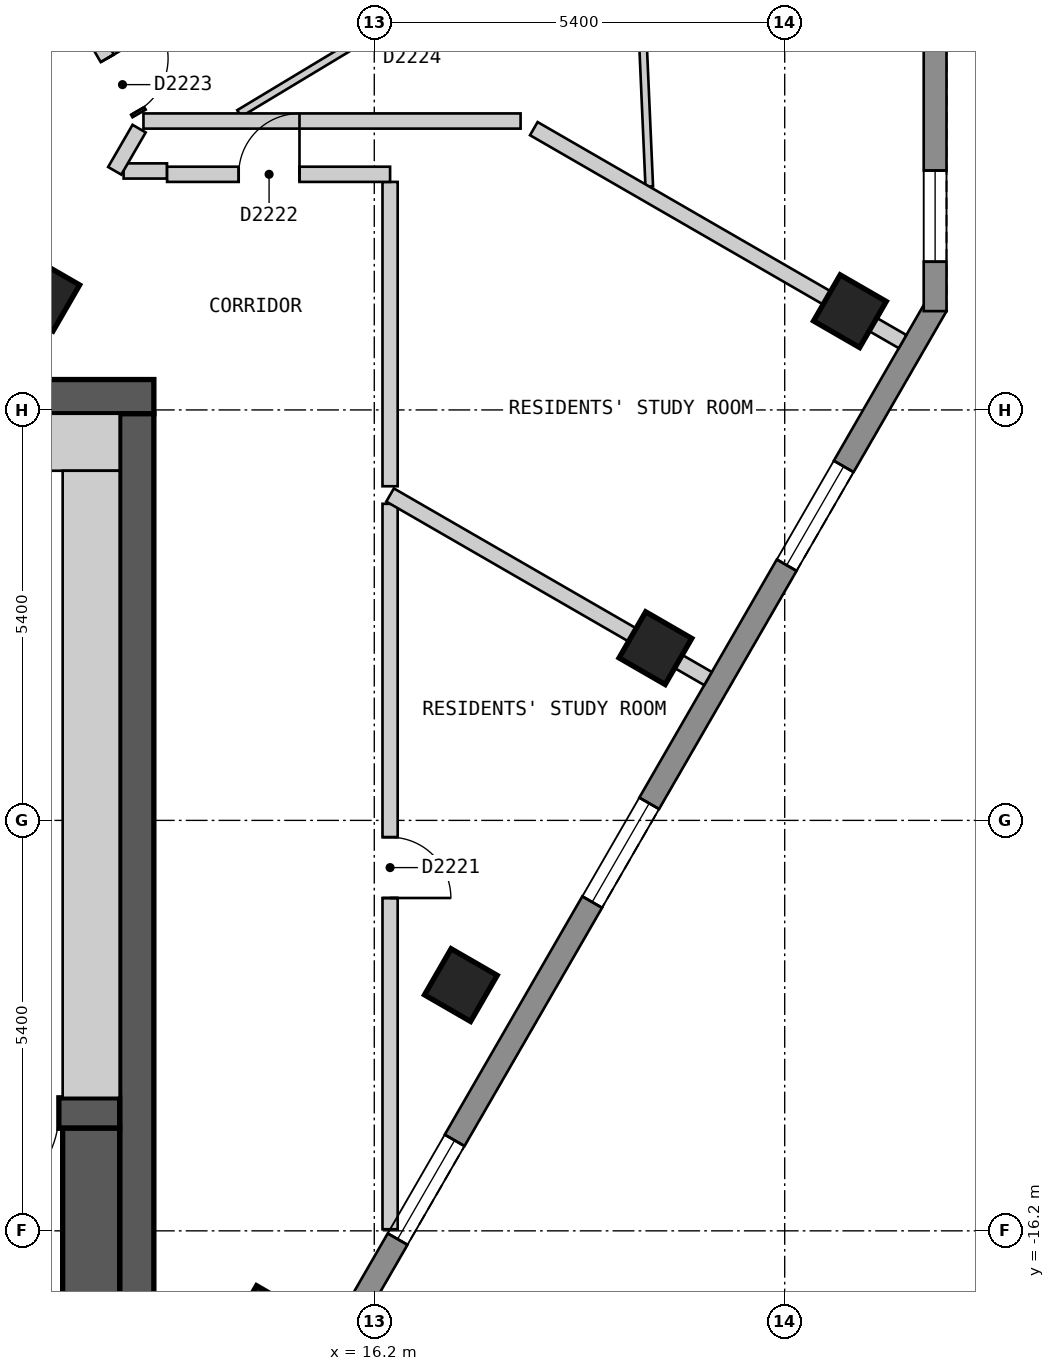
"""IFC4 building model, lengths in metres.
Left out: names, types, materials, properties, quantities, classifications, styles, units other than length and angle.
Written with IfcOpenShell. Run it as: python <this file> out.ifc"""

import sys

from ifc_helpers import new_model, si_unit, direction, frame, frame_2d, origin, origin_2d, place, context, subcontext, project, spatial, polyline, rectangle, outline, extrude, element, fill, save


model = new_model("IFC4")
c1 = context("Model", 3, precision=1e-05, world=origin(), true_north=direction((0.0, 1.0)))
c2 = subcontext(c1, "Body", "Model", "MODEL_VIEW")
j1 = project(units=[si_unit("LENGTHUNIT", "METRE"), si_unit("PLANEANGLEUNIT", "RADIAN")], contexts=[c1])
p1 = place(None, origin())
s1 = spatial("IfcSite", under=j1, at=p1, CompositionType="ELEMENT")
p2 = place(p1, origin())
s2 = spatial("IfcBuilding", under=s1, at=p2, CompositionType="ELEMENT")
p3 = place(p2, frame((0.0, 0.0, 223.8)))
s3 = spatial("IfcBuildingStorey", under=s2, at=p3, CompositionType="ELEMENT", Elevation=223.8)
for number, where, z_axis, x_axis in (
    (1, (14.78, -17.4, 0.0), (0.0, 0.0, 1.0), (0.5, 0.866, 0.0)),
    (2, (17.339, -12.967, 0.0), (0.0, 0.0, 1.0), (0.5, 0.866, 0.0)),
    (3, (19.899, -8.534, 0.0), (0.0, 0.0, 1.0), (0.5, 0.866, 0.0)),
    (4, (22.458, -4.101, 0.0), (0.0, 0.0, 1.0), (0.5, 0.866, 0.0)),
    (5, (11.845, -3.884, 0.0), (0.0, 0.0, 1.0), (0.5, 0.866, 0.0)),
):
    element("IfcColumn", number, at=place(p3, frame(where, z_axis=z_axis, x_axis=x_axis)), inside=s3, PredefinedType="COLUMN", context=c2, shape_type="SweptSolid", body=[
        extrude(rectangle(XDim=0.7, YDim=0.7, at=origin_2d()), origin(), (0.0, 0.0, 1.0), 3.0),
    ])
p4 = place(p3, frame((-13.3, -5.225, 0.0), z_axis=(0.0, 0.0, 1.0), x_axis=(1.0, 0.0, 0.0)))
e6 = element("IfcWall", 6, at=p4, inside=s3, PredefinedType="SHEAR", context=c2, shape_type="SweptSolid", body=[
    extrude(rectangle(XDim=26.6, YDim=0.45, at=frame_2d((13.3, 0.0))), origin(), (0.0, 0.0, 1.0), 2.7),
])
p5 = place(p4, frame((23.65, 0.0, 0.0)))
e7 = element("IfcOpeningElement", 7, at=p5, cuts=e6, PredefinedType="OPENING", context=c2, shape_type="SweptSolid", body=[
    extrude(rectangle(XDim=1.2, YDim=2.1, at=frame_2d((0.6, 1.05))), frame((0.0, 0.235, 0.0), z_axis=(0.0, -1.0, 0.0), x_axis=(1.0, 0.0, 0.0)), (0.0, 0.0, 1.0), 0.47),
])
p6 = place(p3, frame((13.075, -18.55, 0.0), z_axis=(0.0, 0.0, 1.0), x_axis=(0.0, 1.0, 0.0)))
e8 = element("IfcWall", 8, at=p6, inside=s3, PredefinedType="SHEAR", context=c2, shape_type="SweptSolid", body=[
    extrude(rectangle(XDim=13.1, YDim=0.45, at=frame_2d((6.55, 0.0))), origin(), (0.0, 0.0, 1.0), 2.7),
])
p7 = place(p3, frame((-12.85, -14.65, 0.0), z_axis=(0.0, 0.0, 1.0), x_axis=(1.0, 0.0, 0.0)))
e9 = element("IfcWall", 9, at=p7, inside=s3, PredefinedType="SHEAR", context=c2, shape_type="SweptSolid", body=[
    extrude(rectangle(XDim=25.7, YDim=0.4, at=frame_2d((12.85, 0.0))), origin(), (0.0, 0.0, 1.0), 2.7),
])
p8 = place(p7, frame((2.05, 0.0, 0.0), z_axis=(0.0, 0.0, 1.0), x_axis=(-1.0, 0.0, 0.0)))
e10 = element("IfcOpeningElement", 10, at=p8, cuts=e9, PredefinedType="OPENING", context=c2, shape_type="SweptSolid", body=[
    extrude(rectangle(XDim=1.2, YDim=2.1, at=frame_2d((0.6, 1.05))), frame((0.0, 0.21, 0.0), z_axis=(0.0, -1.0, 0.0), x_axis=(1.0, 0.0, 0.0)), (0.0, 0.0, 1.0), 0.42),
])
p9 = place(p7, frame((24.9, 0.0, 0.0), z_axis=(0.0, 0.0, 1.0), x_axis=(-1.0, 0.0, 0.0)))
e11 = element("IfcOpeningElement", 11, at=p9, cuts=e9, PredefinedType="OPENING", context=c2, shape_type="SweptSolid", body=[
    extrude(rectangle(XDim=1.2, YDim=2.1, at=frame_2d((0.6, 1.05))), frame((0.0, 0.21, 0.0), z_axis=(0.0, -1.0, 0.0), x_axis=(1.0, 0.0, 0.0)), (0.0, 0.0, 1.0), 0.42),
])
p10 = place(p7, frame((8.75, 0.0, 0.0), z_axis=(0.0, 0.0, 1.0), x_axis=(-1.0, 0.0, 0.0)))
e12 = element("IfcOpeningElement", 12, at=p10, cuts=e9, PredefinedType="OPENING", context=c2, shape_type="SweptSolid", body=[
    extrude(rectangle(XDim=1.0, YDim=2.1, at=frame_2d((0.5, 1.05))), frame((0.0, 0.21, 0.0), z_axis=(0.0, -1.0, 0.0), x_axis=(1.0, 0.0, 0.0)), (0.0, 0.0, 1.0), 0.42),
])
p11 = place(p7, frame((11.5, 0.0, 0.0), z_axis=(0.0, 0.0, 1.0), x_axis=(-1.0, 0.0, 0.0)))
e13 = element("IfcOpeningElement", 13, at=p11, cuts=e9, PredefinedType="OPENING", context=c2, shape_type="SweptSolid", body=[
    extrude(rectangle(XDim=0.9, YDim=2.1, at=frame_2d((0.45, 1.05))), frame((0.0, 0.21, 0.0), z_axis=(0.0, -1.0, 0.0), x_axis=(1.0, 0.0, 0.0)), (0.0, 0.0, 1.0), 0.42),
])
p12 = place(p7, frame((14.3, 0.0, 0.0), z_axis=(0.0, 0.0, 1.0), x_axis=(-1.0, 0.0, 0.0)))
e14 = element("IfcOpeningElement", 14, at=p12, cuts=e9, PredefinedType="OPENING", context=c2, shape_type="SweptSolid", body=[
    extrude(rectangle(XDim=1.0, YDim=2.1, at=frame_2d((0.5, 1.05))), frame((0.0, 0.21, 0.0), z_axis=(0.0, -1.0, 0.0), x_axis=(1.0, 0.0, 0.0)), (0.0, 0.0, 1.0), 0.42),
])
p13 = place(p7, frame((17.9, 0.0, 0.0), z_axis=(0.0, 0.0, 1.0), x_axis=(-1.0, 0.0, 0.0)))
e15 = element("IfcOpeningElement", 15, at=p13, cuts=e9, PredefinedType="OPENING", context=c2, shape_type="SweptSolid", body=[
    extrude(rectangle(XDim=1.0, YDim=2.1, at=frame_2d((0.5, 1.05))), frame((0.0, 0.21, 0.0), z_axis=(0.0, -1.0, 0.0), x_axis=(1.0, 0.0, 0.0)), (0.0, 0.0, 1.0), 0.42),
])
p14 = place(p3, frame((15.285, -18.425, 0.0), z_axis=(0.0, 0.0, 1.0), x_axis=(0.500012653391, 0.866018098222, 0.0)))
e16 = element("IfcWall", 16, at=p14, inside=s3, PredefinedType="SOLIDWALL", context=c2, shape_type="SweptSolid", body=[
    extrude(outline(polyline([(0.0, -0.15), (16.628, -0.15), (16.548, 0.15), (0.08, 0.15), (0.0, -0.15)])), origin(), (0.0, 0.0, 1.0), 2.7),
])
p15 = place(p14, frame((2.444, 0.0, 0.15)))
e17 = element("IfcOpeningElement", 17, at=p15, cuts=e16, PredefinedType="OPENING", context=c2, shape_type="SweptSolid", body=[
    extrude(rectangle(XDim=1.5, YDim=2.1, at=frame_2d((0.75, 1.05))), frame((0.0, 0.16, 0.0), z_axis=(0.0, -1.0, 0.0), x_axis=(1.0, 0.0, 0.0)), (0.0, 0.0, 1.0), 0.32),
])
p16 = place(p14, frame((7.564, 0.0, 0.15)))
e18 = element("IfcOpeningElement", 18, at=p16, cuts=e16, PredefinedType="OPENING", context=c2, shape_type="SweptSolid", body=[
    extrude(rectangle(XDim=1.5, YDim=2.1, at=frame_2d((0.75, 1.05))), frame((0.0, 0.16, 0.0), z_axis=(0.0, -1.0, 0.0), x_axis=(1.0, 0.0, 0.0)), (0.0, 0.0, 1.0), 0.32),
])
p17 = place(p14, frame((12.682, 0.0, 0.15)))
e19 = element("IfcOpeningElement", 19, at=p17, cuts=e16, PredefinedType="OPENING", context=c2, shape_type="SweptSolid", body=[
    extrude(rectangle(XDim=1.5, YDim=2.1, at=frame_2d((0.75, 1.05))), frame((0.0, 0.16, 0.0), z_axis=(0.0, -1.0, 0.0), x_axis=(1.0, 0.0, 0.0)), (0.0, 0.0, 1.0), 0.32),
])
p18 = place(p3, frame((23.579, -4.1, 0.0), z_axis=(0.0, 0.0, 1.0), x_axis=(0.0, 1.0, 0.0)))
e20 = element("IfcWall", 20, at=p18, inside=s3, PredefinedType="SOLIDWALL", context=c2, shape_type="SweptSolid", body=[
    extrude(outline(polyline([(0.0, -0.15), (5.0, -0.15), (4.92, 0.15), (0.08, 0.15), (0.0, -0.15)])), origin(), (0.0, 0.0, 1.0), 2.7),
])
p19 = place(p18, frame((0.65, 0.0, 0.15)))
e21 = element("IfcOpeningElement", 21, at=p19, cuts=e20, PredefinedType="OPENING", context=c2, shape_type="SweptSolid", body=[
    extrude(rectangle(XDim=1.2, YDim=2.1, at=frame_2d((0.6, 1.05))), frame((0.0, 0.16, 0.0), z_axis=(0.0, -1.0, 0.0), x_axis=(1.0, 0.0, 0.0)), (0.0, 0.0, 1.0), 0.32),
])
p20 = place(p3, frame((9.238, 5.2, 0.0), z_axis=(0.0, 0.0, 1.0), x_axis=(0.500025705601, -0.86601056214, 0.0)))
e22 = element("IfcWall", 22, at=p20, inside=s3, PredefinedType="PARTITIONING", context=c2, shape_type="SweptSolid", body=[
    extrude(rectangle(XDim=7.735, YDim=0.2, at=frame_2d((3.868, 0.0))), origin(), (0.0, 0.0, 1.0), 2.7),
])
p21 = place(p20, frame((6.898, 0.0, 0.0)))
e23 = element("IfcOpeningElement", 23, at=p21, cuts=e22, PredefinedType="OPENING", context=c2, shape_type="SweptSolid", body=[
    extrude(rectangle(XDim=0.8, YDim=2.1, at=frame_2d((0.4, 1.05))), frame((0.0, 0.11, 0.0), z_axis=(0.0, -1.0, 0.0), x_axis=(1.0, 0.0, 0.0)), (0.0, 0.0, 1.0), 0.22),
])
p22 = place(p20, frame((1.988, 0.0, 0.0)))
e24 = element("IfcOpeningElement", 24, at=p22, cuts=e22, PredefinedType="OPENING", context=c2, shape_type="SweptSolid", body=[
    extrude(rectangle(XDim=1.0, YDim=2.1, at=frame_2d((0.5, 1.05))), frame((0.0, 0.11, 0.0), z_axis=(0.0, -1.0, 0.0), x_axis=(1.0, 0.0, 0.0)), (0.0, 0.0, 1.0), 0.22),
])
p23 = place(p3, frame((16.408, -2.4, 0.0), z_axis=(0.0, 0.0, 1.0), x_axis=(0.0, -1.0, 0.0)))
e25 = element("IfcWall", 25, at=p23, inside=s3, PredefinedType="PARTITIONING", context=c2, shape_type="SweptSolid", body=[
    extrude(rectangle(XDim=4.004, YDim=0.2, at=frame_2d((2.002, 0.0))), origin(), (0.0, 0.0, 1.0), 2.7),
])
p24 = place(p3, frame((12.902, -2.256, 0.0), z_axis=(0.0, 0.0, 1.0), x_axis=(1.0, 0.0, 0.0)))
e26 = element("IfcWall", 26, at=p24, inside=s3, PredefinedType="PARTITIONING", context=c2, shape_type="SweptSolid", body=[
    extrude(rectangle(XDim=0.571, YDim=0.2, at=frame_2d((0.285, 0.0))), origin(), (0.0, 0.0, 1.0), 2.7),
])
p25 = place(p3, frame((13.474, -2.3, 0.0), z_axis=(0.0, 0.0, 1.0), x_axis=(1.0, 0.0, 0.0)))
e27 = element("IfcWall", 27, at=p25, inside=s3, PredefinedType="PARTITIONING", context=c2, shape_type="SweptSolid", body=[
    extrude(rectangle(XDim=2.934, YDim=0.2, at=frame_2d((1.467, 0.0))), origin(), (0.0, 0.0, 1.0), 2.7),
])
p26 = place(p25, frame((0.942, 0.0, 0.0)))
e28 = element("IfcOpeningElement", 28, at=p26, cuts=e27, PredefinedType="OPENING", context=c2, shape_type="SweptSolid", body=[
    extrude(rectangle(XDim=0.8, YDim=2.1, at=frame_2d((0.4, 1.05))), frame((0.0, 0.11, 0.0), z_axis=(0.0, -1.0, 0.0), x_axis=(1.0, 0.0, 0.0)), (0.0, 0.0, 1.0), 0.22),
])
p27 = place(p3, frame((12.785, -2.254, 0.0), z_axis=(0.0, 0.0, 1.0), x_axis=(0.500766044352, 0.865582675903, 0.0)))
e29 = element("IfcWall", 29, at=p27, inside=s3, PredefinedType="PARTITIONING", context=c2, shape_type="SweptSolid", body=[
    extrude(rectangle(XDim=0.641, YDim=0.2, at=frame_2d((0.321, 0.0))), origin(), (0.0, 0.0, 1.0), 2.7),
])
p28 = place(p3, frame((16.408, -16.179, 0.0), z_axis=(0.0, 0.0, 1.0), x_axis=(0.0, 1.0, 0.0)))
e30 = element("IfcWall", 30, at=p28, inside=s3, PredefinedType="PARTITIONING", context=c2, shape_type="SweptSolid", body=[
    extrude(rectangle(XDim=9.544, YDim=0.2, at=frame_2d((4.772, 0.0))), origin(), (0.0, 0.0, 1.0), 2.7),
])
p29 = place(p28, frame((4.358, 0.0, 0.0)))
e31 = element("IfcOpeningElement", 31, at=p29, cuts=e30, PredefinedType="OPENING", context=c2, shape_type="SweptSolid", body=[
    extrude(rectangle(XDim=0.8, YDim=2.1, at=frame_2d((0.4, 1.05))), frame((0.0, 0.11, 0.0), z_axis=(0.0, -1.0, 0.0), x_axis=(1.0, 0.0, 0.0)), (0.0, 0.0, 1.0), 0.22),
])
p30 = place(p3, frame((19.67, 0.909, 0.0), z_axis=(0.0, 0.0, 1.0), x_axis=(0.043933486644, -0.99903445824, 0.0)))
e32 = element("IfcWall", 32, at=p30, inside=s3, PredefinedType="PARTITIONING", context=c2, shape_type="SweptSolid", body=[
    extrude(rectangle(XDim=3.373, YDim=0.1, at=frame_2d((1.687, 0.0))), origin(), (0.0, 0.0, 1.0), 2.7),
])
p31 = place(p3, frame((14.423, -1.499, 0.0), z_axis=(0.0, 0.0, 1.0), x_axis=(0.856512638305, 0.516126050905, 0.0)))
e33 = element("IfcWall", 33, at=p31, inside=s3, PredefinedType="PARTITIONING", context=c2, shape_type="SweptSolid", body=[
    extrude(rectangle(XDim=4.776, YDim=0.1, at=frame_2d((2.388, 0.0))), origin(), (0.0, 0.0, 1.0), 2.7),
])
p32 = place(p31, frame((1.936, 0.0, 0.0)))
e34 = element("IfcOpeningElement", 34, at=p32, cuts=e33, PredefinedType="OPENING", context=c2, shape_type="SweptSolid", body=[
    extrude(rectangle(XDim=0.8, YDim=2.1, at=frame_2d((0.4, 1.05))), frame((0.0, 0.06, 0.0), z_axis=(0.0, -1.0, 0.0), x_axis=(1.0, 0.0, 0.0)), (0.0, 0.0, 1.0), 0.12),
])
p33 = place(p3, frame((18.299, -1.699, 0.0), z_axis=(0.0, 0.0, 1.0), x_axis=(0.865962789554, -0.50010843535, 0.0)))
e35 = element("IfcWall", 35, at=p33, inside=s3, PredefinedType="PARTITIONING", context=c2, shape_type="SweptSolid", body=[
    extrude(rectangle(XDim=5.603, YDim=0.2, at=frame_2d((2.801, 0.0))), origin(), (0.0, 0.0, 1.0), 2.7),
])
p34 = place(p3, frame((16.408, -6.519, 0.0), z_axis=(0.0, 0.0, 1.0), x_axis=(0.866032396701, -0.499987887718, 0.0)))
e36 = element("IfcWall", 36, at=p34, inside=s3, PredefinedType="PARTITIONING", context=c2, shape_type="SweptSolid", body=[
    extrude(rectangle(XDim=4.83, YDim=0.2, at=frame_2d((2.415, 0.0))), origin(), (0.0, 0.0, 1.0), 2.7),
])
p35 = place(p3, frame((13.163, -1.599, 0.0), z_axis=(0.0, 0.0, 1.0), x_axis=(1.0, 0.0, 0.0)))
e37 = element("IfcWall", 37, at=p35, inside=s3, PredefinedType="PARTITIONING", context=c2, shape_type="SweptSolid", body=[
    extrude(rectangle(XDim=4.962, YDim=0.2, at=frame_2d((2.481, 0.0))), origin(), (0.0, 0.0, 1.0), 2.7),
])
p36 = place(p3, frame((11.55, -5.825, 0.0), z_axis=(0.0, 0.0, 1.0), x_axis=(1.0, 0.0, 0.0)))
e38 = element("IfcWall", 38, at=p36, inside=s3, PredefinedType="PARTITIONING", context=c2, shape_type="SweptSolid", body=[
    extrude(rectangle(XDim=1.3, YDim=0.75, at=frame_2d((0.65, 0.0))), origin(), (0.0, 0.0, 1.0), 2.7),
])
p37 = place(p3, frame((12.475, -17.6, 0.0), z_axis=(0.0, 0.0, 1.0), x_axis=(0.0, 1.0, 0.0)))
e39 = element("IfcWall", 39, at=p37, inside=s3, PredefinedType="SOLIDWALL", context=c2, shape_type="SweptSolid", body=[
    extrude(rectangle(XDim=2.75, YDim=0.75, at=frame_2d((1.375, 0.0))), origin(), (0.0, 0.0, 1.0), 2.7),
])
p38 = place(p3, frame((12.475, -14.45, 0.0), z_axis=(0.0, 0.0, 1.0), x_axis=(0.0, 1.0, 0.0)))
e40 = element("IfcWall", 40, at=p38, inside=s3, PredefinedType="PARTITIONING", context=c2, shape_type="SweptSolid", body=[
    extrude(rectangle(XDim=8.25, YDim=0.75, at=frame_2d((4.125, 0.0))), origin(), (0.0, 0.0, 1.0), 2.7),
])
p39 = place(p15, origin())
e41 = element("IfcWindow", 41, at=p39, inside=s3, PartitioningType="SINGLE_PANEL", PredefinedType="WINDOW", context=c2, shape_type="SweptSolid", body=[
    extrude(rectangle(XDim=1.5, YDim=2.1, at=frame_2d((0.75, 1.05))), frame((0.0, 0.03, 0.0), z_axis=(0.0, -1.0, 0.0), x_axis=(1.0, 0.0, 0.0)), (0.0, 0.0, 1.0), 0.06),
])
fill(e17, e41)
p40 = place(p16, origin())
e42 = element("IfcWindow", 42, at=p40, inside=s3, PartitioningType="SINGLE_PANEL", PredefinedType="WINDOW", context=c2, shape_type="SweptSolid", body=[
    extrude(rectangle(XDim=1.5, YDim=2.1, at=frame_2d((0.75, 1.05))), frame((0.0, 0.03, 0.0), z_axis=(0.0, -1.0, 0.0), x_axis=(1.0, 0.0, 0.0)), (0.0, 0.0, 1.0), 0.06),
])
fill(e18, e42)
p41 = place(p17, origin())
e43 = element("IfcWindow", 43, at=p41, inside=s3, PartitioningType="SINGLE_PANEL", PredefinedType="WINDOW", context=c2, shape_type="SweptSolid", body=[
    extrude(rectangle(XDim=1.5, YDim=2.1, at=frame_2d((0.75, 1.05))), frame((0.0, 0.03, 0.0), z_axis=(0.0, -1.0, 0.0), x_axis=(1.0, 0.0, 0.0)), (0.0, 0.0, 1.0), 0.06),
])
fill(e19, e43)
p42 = place(p19, origin())
e44 = element("IfcWindow", 44, at=p42, inside=s3, PartitioningType="SINGLE_PANEL", PredefinedType="WINDOW", context=c2, shape_type="SweptSolid", body=[
    extrude(rectangle(XDim=1.2, YDim=2.1, at=frame_2d((0.6, 1.05))), frame((0.0, 0.03, 0.0), z_axis=(0.0, -1.0, 0.0), x_axis=(1.0, 0.0, 0.0)), (0.0, 0.0, 1.0), 0.06),
])
fill(e21, e44)
p43 = place(p29, origin())
e45 = element("IfcDoor", 45, at=p43, inside=s3, OperationType="SINGLE_SWING_LEFT", PredefinedType="DOOR", context=c2, shape_type="SweptSolid", body=[
    extrude(rectangle(XDim=0.8, YDim=2.1, at=frame_2d((0.4, 1.05))), frame((0.0, 0.025, 0.0), z_axis=(0.0, -1.0, 0.0), x_axis=(1.0, 0.0, 0.0)), (0.0, 0.0, 1.0), 0.05),
])
fill(e31, e45)
p44 = place(p26, origin())
e46 = element("IfcDoor", 46, at=p44, inside=s3, OperationType="SINGLE_SWING_RIGHT", PredefinedType="DOOR", context=c2, shape_type="SweptSolid", body=[
    extrude(rectangle(XDim=0.8, YDim=2.1, at=frame_2d((0.4, 1.05))), frame((0.0, 0.025, 0.0), z_axis=(0.0, -1.0, 0.0), x_axis=(1.0, 0.0, 0.0)), (0.0, 0.0, 1.0), 0.05),
])
fill(e28, e46)
p45 = place(p21, origin())
e47 = element("IfcDoor", 47, at=p45, inside=s3, OperationType="SINGLE_SWING_LEFT", PredefinedType="DOOR", context=c2, shape_type="SweptSolid", body=[
    extrude(rectangle(XDim=0.8, YDim=2.1, at=frame_2d((0.4, 1.05))), frame((0.0, 0.025, 0.0), z_axis=(0.0, -1.0, 0.0), x_axis=(1.0, 0.0, 0.0)), (0.0, 0.0, 1.0), 0.05),
])
fill(e23, e47)
p46 = place(p9, origin())
e48 = element("IfcDoor", 48, at=p46, inside=s3, OperationType="SINGLE_SWING_RIGHT", PredefinedType="DOOR", context=c2, shape_type="SweptSolid", body=[
    extrude(rectangle(XDim=1.2, YDim=2.1, at=frame_2d((0.6, 1.05))), frame((0.0, 0.025, 0.0), z_axis=(0.0, -1.0, 0.0), x_axis=(1.0, 0.0, 0.0)), (0.0, 0.0, 1.0), 0.05),
])
fill(e11, e48)
save(model, sys.argv[1])
